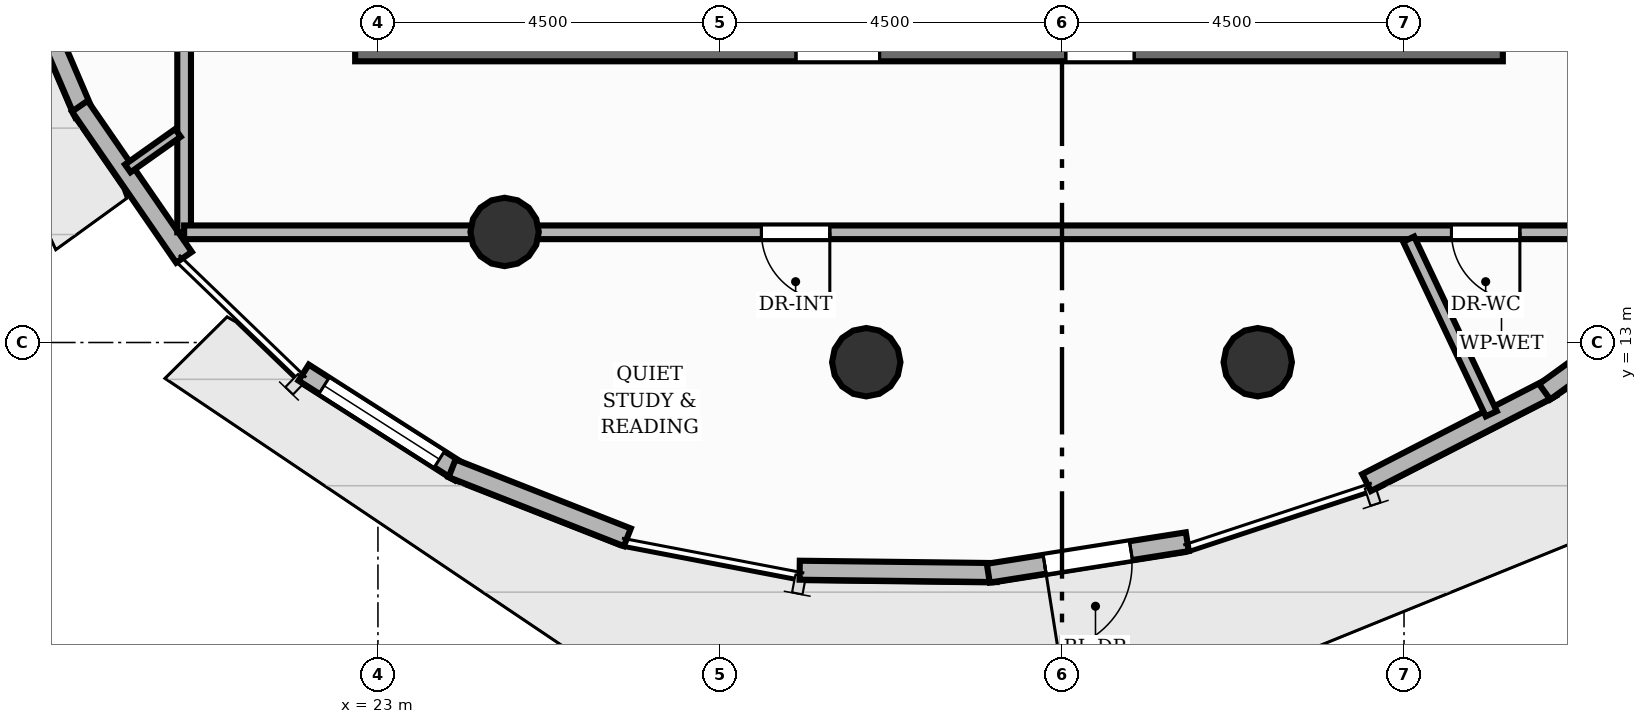
"""IFC4 building model, lengths in metres.
Left out: names, types, materials, properties, quantities, classifications, styles, units other than length and angle.
Written with IfcOpenShell. Run it as: python <this file> out.ifc"""

import sys

from ifc_helpers import new_model, si_unit, direction, frame, frame_2d, origin, origin_2d, place, context, subcontext, project, spatial, rectangle, circle, extrude, element, fill, save


model = new_model("IFC4")
c1 = context("Model", 3, precision=1e-05, world=origin(), true_north=direction((0.0, 1.0)))
c2 = subcontext(c1, "Body", "Model", "MODEL_VIEW")
j1 = project(units=[si_unit("LENGTHUNIT", "METRE"), si_unit("PLANEANGLEUNIT", "RADIAN")], contexts=[c1])
p1 = place(None, origin())
s1 = spatial("IfcSite", under=j1, at=p1, CompositionType="ELEMENT")
p2 = place(p1, origin())
s2 = spatial("IfcBuilding", under=s1, at=p2, CompositionType="ELEMENT")
p3 = place(p2, frame((0.0, 0.0, 163.04)))
s3 = spatial("IfcBuildingStorey", under=s2, at=p3, CompositionType="ELEMENT", Elevation=163.04)
p4 = place(p3, frame((22.7, 17.0, 0.0), z_axis=(0.0, 0.0, 1.0), x_axis=(1.0, 0.0, 0.0)))
e1 = element("IfcWall", 1, at=p4, inside=s3, PredefinedType="SHEAR", context=c2, shape_type="SweptSolid", body=[
    extrude(rectangle(XDim=15.1, YDim=0.6, at=frame_2d((7.55, 0.0))), origin(), (0.0, 0.0, 1.0), 3.2),
])
p5 = place(p4, frame((5.8, 0.0, 0.0)))
e2 = element("IfcOpeningElement", 2, at=p5, cuts=e1, PredefinedType="OPENING", context=c2, shape_type="SweptSolid", body=[
    extrude(rectangle(XDim=1.1, YDim=2.15, at=frame_2d((0.55, 1.075))), frame((0.0, 0.31, 0.0), z_axis=(0.0, -1.0, 0.0), x_axis=(1.0, 0.0, 0.0)), (0.0, 0.0, 1.0), 0.62),
])
p6 = place(p4, frame((9.35, 0.0, 0.0)))
e3 = element("IfcOpeningElement", 3, at=p6, cuts=e1, PredefinedType="OPENING", context=c2, shape_type="SweptSolid", body=[
    extrude(rectangle(XDim=0.9, YDim=2.1, at=frame_2d((0.45, 1.05))), frame((0.0, 0.31, 0.0), z_axis=(0.0, -1.0, 0.0), x_axis=(1.0, 0.0, 0.0)), (0.0, 0.0, 1.0), 0.62),
])
for number, where, z_axis, x_axis in (
    (4, (24.667, 14.455, 0.0), (0.0, 0.0, 1.0), (1.0, 0.0, 0.0)),
    (5, (29.425, 12.74, 0.0), (0.0, 0.0, 1.0), (1.0, 0.0, 0.0)),
    (6, (34.575, 12.74, 0.0), (0.0, 0.0, 1.0), (1.0, 0.0, 0.0)),
):
    element("IfcColumn", number, at=place(p3, frame(where, z_axis=z_axis, x_axis=x_axis)), inside=s3, PredefinedType="COLUMN", context=c2, shape_type="SweptSolid", body=[
        extrude(circle(Radius=0.45, at=origin_2d()), origin(), (0.0, 0.0, 1.0), 3.2),
    ])
p7 = place(p3, frame((19.133, 16.009, 0.0), z_axis=(0.0, 0.0, 1.0), x_axis=(-0.393822567199, 0.919186480299, 0.0)))
e7 = element("IfcWall", 7, at=p7, inside=s3, PredefinedType="SOLIDWALL", context=c2, shape_type="SweptSolid", body=[
    extrude(rectangle(XDim=2.437, YDim=0.25, at=frame_2d((1.219, 0.0))), origin(), (0.0, 0.0, 1.0), 2.96),
])
p8 = place(p3, frame((20.448, 14.121, 0.0), z_axis=(0.0, 0.0, 1.0), x_axis=(-0.567536828079, 0.823348011945, 0.0)))
e8 = element("IfcWall", 8, at=p8, inside=s3, PredefinedType="SOLIDWALL", context=c2, shape_type="SweptSolid", body=[
    extrude(rectangle(XDim=2.415, YDim=0.25, at=frame_2d((1.207, 0.0))), origin(), (0.0, 0.0, 1.0), 2.96),
])
p9 = place(p3, frame((24.077, 11.293, 0.0), z_axis=(0.0, 0.0, 1.0), x_axis=(-0.842951209937, 0.537990016325, 0.0)))
e9 = element("IfcWall", 9, at=p9, inside=s3, PredefinedType="SOLIDWALL", context=c2, shape_type="SweptSolid", body=[
    extrude(rectangle(XDim=2.437, YDim=0.25, at=frame_2d((1.219, 0.0))), origin(), (0.0, 0.0, 1.0), 2.96),
])
p10 = place(p9, frame((0.318, 0.0, 0.85)))
e10 = element("IfcOpeningElement", 10, at=p10, cuts=e9, PredefinedType="OPENING", context=c2, shape_type="SweptSolid", body=[
    extrude(rectangle(XDim=1.8, YDim=1.52, at=frame_2d((0.9, 0.76))), frame((0.0, 0.135, 0.0), z_axis=(0.0, -1.0, 0.0), x_axis=(1.0, 0.0, 0.0)), (0.0, 0.0, 1.0), 0.27),
])
p11 = place(p3, frame((26.281, 10.437, 0.0), z_axis=(0.0, 0.0, 1.0), x_axis=(-0.930554944455, 0.366152284371, 0.0)))
e11 = element("IfcWall", 11, at=p11, inside=s3, PredefinedType="SOLIDWALL", context=c2, shape_type="SweptSolid", body=[
    extrude(rectangle(XDim=2.478, YDim=0.25, at=frame_2d((1.239, 0.0))), origin(), (0.0, 0.0, 1.0), 2.96),
])
p12 = place(p3, frame((31.141, 9.973, 0.0), z_axis=(0.0, 0.0, 1.0), x_axis=(-0.999928463579, 0.011961092105, 0.0)))
e12 = element("IfcWall", 12, at=p12, inside=s3, PredefinedType="SOLIDWALL", context=c2, shape_type="SweptSolid", body=[
    extrude(rectangle(XDim=2.592, YDim=0.25, at=frame_2d((1.296, 0.0))), origin(), (0.0, 0.0, 1.0), 2.96),
])
p13 = place(p3, frame((33.649, 10.379, 0.0), z_axis=(0.0, 0.0, 1.0), x_axis=(-0.987726348775, -0.156194301867, 0.0)))
e13 = element("IfcWall", 13, at=p13, inside=s3, PredefinedType="SOLIDWALL", context=c2, shape_type="SweptSolid", body=[
    extrude(rectangle(XDim=2.651, YDim=0.25, at=frame_2d((1.325, 0.0))), origin(), (0.0, 0.0, 1.0), 2.96),
])
p14 = place(p13, frame((0.751, 0.0, 0.0)))
e14 = element("IfcOpeningElement", 14, at=p14, cuts=e13, PredefinedType="OPENING", context=c2, shape_type="SweptSolid", body=[
    extrude(rectangle(XDim=1.15, YDim=2.2, at=frame_2d((0.575, 1.1))), frame((0.0, 0.135, 0.0), z_axis=(0.0, -1.0, 0.0), x_axis=(1.0, 0.0, 0.0)), (0.0, 0.0, 1.0), 0.27),
])
p15 = place(p3, frame((38.442, 12.409, 0.0), z_axis=(0.0, 0.0, 1.0), x_axis=(-0.889378950916, -0.457170735796, 0.0)))
e15 = element("IfcWall", 15, at=p15, inside=s3, PredefinedType="SOLIDWALL", context=c2, shape_type="SweptSolid", body=[
    extrude(rectangle(XDim=2.739, YDim=0.25, at=frame_2d((1.369, 0.0))), origin(), (0.0, 0.0, 1.0), 2.96),
])
p16 = place(p3, frame((40.582, 13.972, 0.0), z_axis=(0.0, 0.0, 1.0), x_axis=(-0.809302211878, -0.587392483651, 0.0)))
e16 = element("IfcWall", 16, at=p16, inside=s3, PredefinedType="SOLIDWALL", context=c2, shape_type="SweptSolid", body=[
    extrude(rectangle(XDim=2.758, YDim=0.25, at=frame_2d((1.379, 0.0))), origin(), (0.0, 0.0, 1.0), 2.96),
])
p17 = place(p16, frame((0.679, 0.0, 0.85)))
e17 = element("IfcOpeningElement", 17, at=p17, cuts=e16, PredefinedType="OPENING", context=c2, shape_type="SweptSolid", body=[
    extrude(rectangle(XDim=1.4, YDim=1.52, at=frame_2d((0.7, 0.76))), frame((0.0, 0.135, 0.0), z_axis=(0.0, -1.0, 0.0), x_axis=(1.0, 0.0, 0.0)), (0.0, 0.0, 1.0), 0.27),
])
p18 = place(p3, frame((20.45, 14.45, 0.0), z_axis=(0.0, 0.0, 1.0), x_axis=(0.0, 1.0, 0.0)))
e18 = element("IfcWall", 18, at=p18, inside=s3, PredefinedType="PARTITIONING", context=c2, shape_type="SweptSolid", body=[
    extrude(rectangle(XDim=7.15, YDim=0.18, at=frame_2d((3.575, 0.0))), origin(), (0.0, 0.0, 1.0), 2.488),
])
p19 = place(p18, frame((4.496, 0.0, 0.0)))
e19 = element("IfcOpeningElement", 19, at=p19, cuts=e18, PredefinedType="OPENING", context=c2, shape_type="SweptSolid", body=[
    extrude(rectangle(XDim=0.9, YDim=2.1, at=frame_2d((0.45, 1.05))), frame((0.0, 0.1, 0.0), z_axis=(0.0, -1.0, 0.0), x_axis=(1.0, 0.0, 0.0)), (0.0, 0.0, 1.0), 0.2),
])
p20 = place(p3, frame((40.05, 14.45, 0.0), z_axis=(0.0, 0.0, 1.0), x_axis=(-1.0, 0.0, 0.0)))
e20 = element("IfcWall", 20, at=p20, inside=s3, PredefinedType="PARTITIONING", context=c2, shape_type="SweptSolid", body=[
    extrude(rectangle(XDim=19.6, YDim=0.18, at=frame_2d((9.8, 0.0))), origin(), (0.0, 0.0, 1.0), 2.488),
])
p21 = place(p20, frame((11.105, 0.0, 0.0)))
e21 = element("IfcOpeningElement", 21, at=p21, cuts=e20, PredefinedType="OPENING", context=c2, shape_type="SweptSolid", body=[
    extrude(rectangle(XDim=0.9, YDim=2.1, at=frame_2d((0.45, 1.05))), frame((0.0, 0.1, 0.0), z_axis=(0.0, -1.0, 0.0), x_axis=(1.0, 0.0, 0.0)), (0.0, 0.0, 1.0), 0.2),
])
p22 = place(p20, frame((2.026, 0.0, 0.0)))
e22 = element("IfcOpeningElement", 22, at=p22, cuts=e20, PredefinedType="OPENING", context=c2, shape_type="SweptSolid", body=[
    extrude(rectangle(XDim=0.9, YDim=2.1, at=frame_2d((0.45, 1.05))), frame((0.0, 0.1, 0.0), z_axis=(0.0, -1.0, 0.0), x_axis=(1.0, 0.0, 0.0)), (0.0, 0.0, 1.0), 0.2),
])
p23 = place(p3, frame((20.368, 15.758, 0.0), z_axis=(0.0, 0.0, 1.0), x_axis=(-0.815971082195, -0.57809272009, 0.0)))
e23 = element("IfcWall", 23, at=p23, inside=s3, PredefinedType="PARTITIONING", context=c2, shape_type="SweptSolid", body=[
    extrude(rectangle(XDim=0.809, YDim=0.125, at=frame_2d((0.404, 0.0))), origin(), (0.0, 0.0, 1.0), 2.955),
])
p24 = place(p3, frame((36.561, 14.36, 0.0), z_axis=(0.0, 0.0, 1.0), x_axis=(0.427702244689, -0.903919681105, 0.0)))
e24 = element("IfcWall", 24, at=p24, inside=s3, PredefinedType="PLUMBINGWALL", context=c2, shape_type="SweptSolid", body=[
    extrude(rectangle(XDim=2.541, YDim=0.16, at=frame_2d((1.271, 0.0))), origin(), (0.0, 0.0, 1.0), 2.955),
])
p25 = place(p14, origin())
e25 = element("IfcDoor", 25, at=p25, inside=s3, OperationType="SINGLE_SWING_RIGHT", PredefinedType="DOOR", context=c2, shape_type="SweptSolid", body=[
    extrude(rectangle(XDim=1.15, YDim=2.2, at=frame_2d((0.575, 1.1))), frame((0.0, 0.025, 0.0), z_axis=(0.0, -1.0, 0.0), x_axis=(1.0, 0.0, 0.0)), (0.0, 0.0, 1.0), 0.05),
])
fill(e14, e25)
p26 = place(p10, origin())
e26 = element("IfcWindow", 26, at=p26, inside=s3, PartitioningType="SINGLE_PANEL", PredefinedType="WINDOW", context=c2, shape_type="SweptSolid", body=[
    extrude(rectangle(XDim=1.8, YDim=1.52, at=frame_2d((0.9, 0.76))), frame((0.0, 0.03, 0.0), z_axis=(0.0, -1.0, 0.0), x_axis=(1.0, 0.0, 0.0)), (0.0, 0.0, 1.0), 0.06),
])
fill(e10, e26)
p27 = place(p21, origin())
e27 = element("IfcDoor", 27, at=p27, inside=s3, OperationType="SINGLE_SWING_LEFT", PredefinedType="DOOR", context=c2, shape_type="SweptSolid", body=[
    extrude(rectangle(XDim=0.9, YDim=2.1, at=frame_2d((0.45, 1.05))), frame((0.0, 0.025, 0.0), z_axis=(0.0, -1.0, 0.0), x_axis=(1.0, 0.0, 0.0)), (0.0, 0.0, 1.0), 0.05),
])
fill(e21, e27)
p28 = place(p22, origin())
e28 = element("IfcDoor", 28, at=p28, inside=s3, OperationType="SINGLE_SWING_LEFT", PredefinedType="DOOR", context=c2, shape_type="SweptSolid", body=[
    extrude(rectangle(XDim=0.9, YDim=2.1, at=frame_2d((0.45, 1.05))), frame((0.0, 0.025, 0.0), z_axis=(0.0, -1.0, 0.0), x_axis=(1.0, 0.0, 0.0)), (0.0, 0.0, 1.0), 0.05),
])
fill(e22, e28)
save(model, sys.argv[1])
